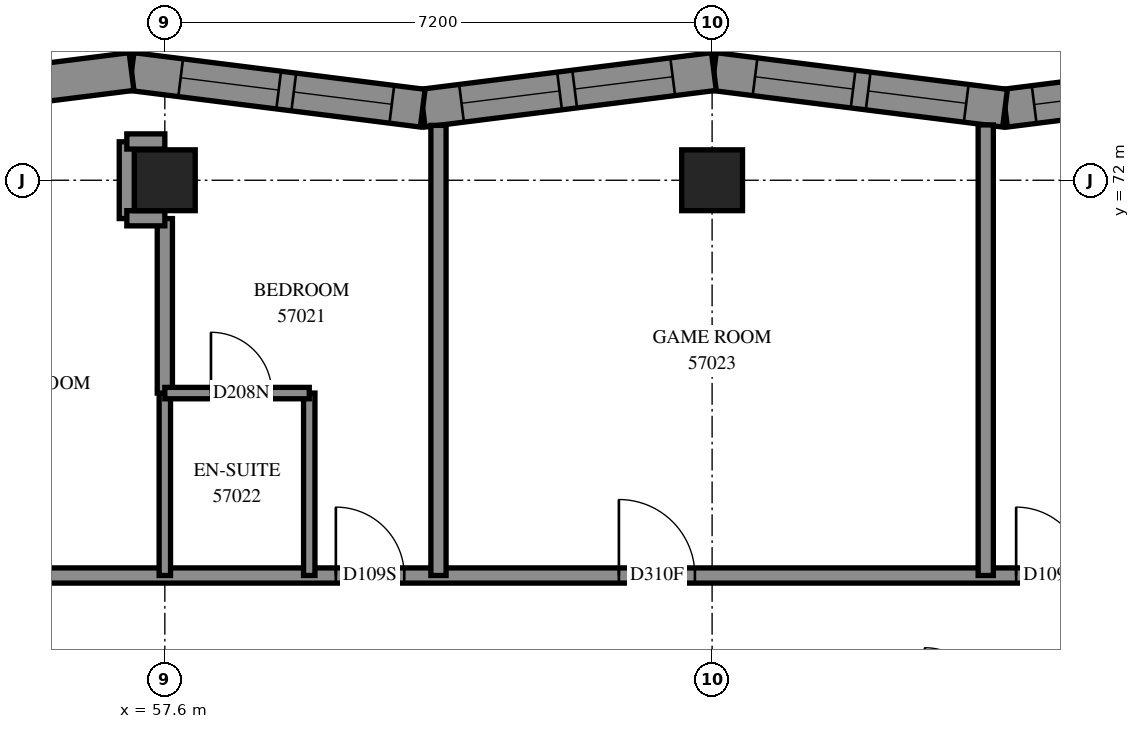
"""IFC4 building model, lengths in metres.
Left out: names, types, materials, properties, quantities, classifications, styles, units other than length and angle.
Written with IfcOpenShell. Run it as: python <this file> out.ifc"""

import sys

from ifc_helpers import new_model, si_unit, direction, frame, frame_2d, origin, origin_2d, place, context, subcontext, project, spatial, polyline, rectangle, outline, extrude, element, fill, save


model = new_model("IFC4")
c1 = context("Model", 3, precision=1e-05, world=origin(), true_north=direction((0.0, 1.0)))
c2 = subcontext(c1, "Body", "Model", "MODEL_VIEW")
j1 = project(units=[si_unit("LENGTHUNIT", "METRE"), si_unit("PLANEANGLEUNIT", "RADIAN")], contexts=[c1])
p1 = place(None, origin())
s1 = spatial("IfcSite", under=j1, at=p1, CompositionType="ELEMENT")
p2 = place(p1, origin())
s2 = spatial("IfcBuilding", under=s1, at=p2, CompositionType="ELEMENT")
p3 = place(p2, frame((0.0, 0.0, 210.0)))
s3 = spatial("IfcBuildingStorey", under=s2, at=p3, CompositionType="ELEMENT", Elevation=210.0)
for number, where, z_axis, x_axis in (
    (1, (57.6, 72.0, 0.0), (0.0, 0.0, 1.0), (1.0, 0.0, 0.0)),
    (2, (64.8, 72.0, 0.0), (0.0, 0.0, 1.0), (1.0, 0.0, 0.0)),
):
    element("IfcColumn", number, at=place(p3, frame(where, z_axis=z_axis, x_axis=x_axis)), inside=s3, PredefinedType="COLUMN", context=c2, shape_type="SweptSolid", body=[
        extrude(rectangle(XDim=0.8, YDim=0.8, at=origin_2d()), origin(), (0.0, 0.0, 1.0), 3.1),
    ])
p4 = place(p3, frame((72.484, 73.43, 0.0), z_axis=(0.0, 0.0, 1.0), x_axis=(-0.9921759282, -0.1248476171, 0.0)))
e3 = element("IfcWall", 3, at=p4, inside=s3, PredefinedType="SOLIDWALL", context=c2, shape_type="SweptSolid", body=[
    extrude(outline(polyline([(-0.032, -0.25), (3.829, -0.25), (3.892, 0.25), (0.032, 0.25), (-0.032, -0.25)])), origin(), (0.0, 0.0, 1.0), 3.1),
])
p5 = place(p4, frame((0.674, 0.0, 0.45)))
e4 = element("IfcOpeningElement", 4, at=p5, cuts=e3, PredefinedType="OPENING", context=c2, shape_type="SweptSolid", body=[
    extrude(rectangle(XDim=1.3, YDim=2.5, at=frame_2d((0.65, 1.25))), frame((0.0, 0.26, 0.0), z_axis=(0.0, -1.0, 0.0), x_axis=(1.0, 0.0, 0.0)), (0.0, 0.0, 1.0), 0.52),
])
p6 = place(p4, frame((2.174, 0.0, 0.45)))
e5 = element("IfcOpeningElement", 5, at=p6, cuts=e3, PredefinedType="OPENING", context=c2, shape_type="SweptSolid", body=[
    extrude(rectangle(XDim=1.3, YDim=2.5, at=frame_2d((0.65, 1.25))), frame((0.0, 0.26, 0.0), z_axis=(0.0, -1.0, 0.0), x_axis=(1.0, 0.0, 0.0)), (0.0, 0.0, 1.0), 0.52),
])
p7 = place(p3, frame((68.654, 72.948, 0.0), z_axis=(0.0, 0.0, 1.0), x_axis=(-0.9921759282, 0.1248476171, 0.0)))
e6 = element("IfcWall", 6, at=p7, inside=s3, PredefinedType="SOLIDWALL", context=c2, shape_type="SweptSolid", body=[
    extrude(outline(polyline([(0.032, -0.25), (3.892, -0.25), (3.829, 0.25), (-0.032, 0.25), (0.032, -0.25)])), origin(), (0.0, 0.0, 1.0), 3.1),
])
p8 = place(p7, frame((0.515, 0.0, 0.45)))
e7 = element("IfcOpeningElement", 7, at=p8, cuts=e6, PredefinedType="OPENING", context=c2, shape_type="SweptSolid", body=[
    extrude(rectangle(XDim=1.3, YDim=2.5, at=frame_2d((0.65, 1.25))), frame((0.0, 0.26, 0.0), z_axis=(0.0, -1.0, 0.0), x_axis=(1.0, 0.0, 0.0)), (0.0, 0.0, 1.0), 0.52),
])
p9 = place(p7, frame((2.015, 0.0, 0.45)))
e8 = element("IfcOpeningElement", 8, at=p9, cuts=e6, PredefinedType="OPENING", context=c2, shape_type="SweptSolid", body=[
    extrude(rectangle(XDim=1.3, YDim=2.5, at=frame_2d((0.65, 1.25))), frame((0.0, 0.26, 0.0), z_axis=(0.0, -1.0, 0.0), x_axis=(1.0, 0.0, 0.0)), (0.0, 0.0, 1.0), 0.52),
])
p10 = place(p3, frame((64.823, 73.43, 0.0), z_axis=(0.0, 0.0, 1.0), x_axis=(-0.9921759282, -0.1248476171, 0.0)))
e9 = element("IfcWall", 9, at=p10, inside=s3, PredefinedType="SOLIDWALL", context=c2, shape_type="SweptSolid", body=[
    extrude(outline(polyline([(-0.032, -0.25), (3.829, -0.25), (3.892, 0.25), (0.032, 0.25), (-0.032, -0.25)])), origin(), (0.0, 0.0, 1.0), 3.1),
])
p11 = place(p10, frame((0.546, 0.0, 0.45)))
e10 = element("IfcOpeningElement", 10, at=p11, cuts=e9, PredefinedType="OPENING", context=c2, shape_type="SweptSolid", body=[
    extrude(rectangle(XDim=1.3, YDim=2.5, at=frame_2d((0.65, 1.25))), frame((0.0, 0.26, 0.0), z_axis=(0.0, -1.0, 0.0), x_axis=(1.0, 0.0, 0.0)), (0.0, 0.0, 1.0), 0.52),
])
p12 = place(p10, frame((2.046, 0.0, 0.45)))
e11 = element("IfcOpeningElement", 11, at=p12, cuts=e9, PredefinedType="OPENING", context=c2, shape_type="SweptSolid", body=[
    extrude(rectangle(XDim=1.3, YDim=2.5, at=frame_2d((0.65, 1.25))), frame((0.0, 0.26, 0.0), z_axis=(0.0, -1.0, 0.0), x_axis=(1.0, 0.0, 0.0)), (0.0, 0.0, 1.0), 0.52),
])
p13 = place(p3, frame((60.993, 72.948, 0.0), z_axis=(0.0, 0.0, 1.0), x_axis=(-0.9921759282, 0.1248476171, 0.0)))
e12 = element("IfcWall", 12, at=p13, inside=s3, PredefinedType="SOLIDWALL", context=c2, shape_type="SweptSolid", body=[
    extrude(outline(polyline([(0.032, -0.25), (3.892, -0.25), (3.829, 0.25), (-0.032, 0.25), (0.032, -0.25)])), origin(), (0.0, 0.0, 1.0), 3.1),
])
p14 = place(p13, frame((0.41, 0.0, 0.45)))
e13 = element("IfcOpeningElement", 13, at=p14, cuts=e12, PredefinedType="OPENING", context=c2, shape_type="SweptSolid", body=[
    extrude(rectangle(XDim=1.3, YDim=2.5, at=frame_2d((0.65, 1.25))), frame((0.0, 0.26, 0.0), z_axis=(0.0, -1.0, 0.0), x_axis=(1.0, 0.0, 0.0)), (0.0, 0.0, 1.0), 0.52),
])
p15 = place(p13, frame((1.91, 0.0, 0.45)))
e14 = element("IfcOpeningElement", 14, at=p15, cuts=e12, PredefinedType="OPENING", context=c2, shape_type="SweptSolid", body=[
    extrude(rectangle(XDim=1.3, YDim=2.5, at=frame_2d((0.65, 1.25))), frame((0.0, 0.26, 0.0), z_axis=(0.0, -1.0, 0.0), x_axis=(1.0, 0.0, 0.0)), (0.0, 0.0, 1.0), 0.52),
])
p16 = place(p3, frame((57.162, 73.43, 0.0), z_axis=(0.0, 0.0, 1.0), x_axis=(-0.9921763319, -0.1248444087, 0.0)))
e15 = element("IfcWall", 15, at=p16, inside=s3, PredefinedType="SOLIDWALL", context=c2, shape_type="SweptSolid", body=[
    extrude(outline(polyline([(-0.032, -0.25), (3.829, -0.25), (3.892, 0.25), (0.032, 0.25), (-0.032, -0.25)])), origin(), (0.0, 0.0, 1.0), 3.1),
])
p17 = place(p16, frame((1.109, 0.0, 0.45)))
e16 = element("IfcOpeningElement", 16, at=p17, cuts=e15, PredefinedType="OPENING", context=c2, shape_type="SweptSolid", body=[
    extrude(rectangle(XDim=1.2, YDim=2.5, at=frame_2d((0.6, 1.25))), frame((0.0, 0.26, 0.0), z_axis=(0.0, -1.0, 0.0), x_axis=(1.0, 0.0, 0.0)), (0.0, 0.0, 1.0), 0.52),
])
p18 = place(p3, frame((55.6, 66.8, 0.0), z_axis=(0.0, 0.0, 1.0), x_axis=(1.0, 0.0, 0.0)))
e17 = element("IfcWall", 17, at=p18, inside=s3, PredefinedType="PARTITIONING", context=c2, shape_type="SweptSolid", body=[
    extrude(rectangle(XDim=18.4, YDim=0.2, at=frame_2d((9.2, 0.0))), origin(), (0.0, 0.0, 1.0), 3.1),
])
p19 = place(p18, frame((4.25, 0.0, 0.0)))
e18 = element("IfcOpeningElement", 18, at=p19, cuts=e17, PredefinedType="OPENING", context=c2, shape_type="SweptSolid", body=[
    extrude(rectangle(XDim=0.9, YDim=2.1, at=frame_2d((0.45, 1.05))), frame((0.0, 0.11, 0.0), z_axis=(0.0, -1.0, 0.0), x_axis=(1.0, 0.0, 0.0)), (0.0, 0.0, 1.0), 0.22),
])
p20 = place(p18, frame((7.974, 0.0, 0.0)))
e19 = element("IfcOpeningElement", 19, at=p20, cuts=e17, PredefinedType="OPENING", context=c2, shape_type="SweptSolid", body=[
    extrude(rectangle(XDim=1.0, YDim=2.1, at=frame_2d((0.5, 1.05))), frame((0.0, 0.11, 0.0), z_axis=(0.0, -1.0, 0.0), x_axis=(1.0, 0.0, 0.0)), (0.0, 0.0, 1.0), 0.22),
])
p21 = place(p18, frame((13.2, 0.0, 0.0)))
e20 = element("IfcOpeningElement", 20, at=p21, cuts=e17, PredefinedType="OPENING", context=c2, shape_type="SweptSolid", body=[
    extrude(rectangle(XDim=0.9, YDim=2.1, at=frame_2d((0.45, 1.05))), frame((0.0, 0.11, 0.0), z_axis=(0.0, -1.0, 0.0), x_axis=(1.0, 0.0, 0.0)), (0.0, 0.0, 1.0), 0.22),
])
p22 = place(p3, frame((68.4, 66.8, 0.0), z_axis=(0.0, 0.0, 1.0), x_axis=(0.0, 1.0, 0.0)))
e21 = element("IfcWall", 21, at=p22, inside=s3, PredefinedType="PARTITIONING", context=c2, shape_type="SweptSolid", body=[
    extrude(rectangle(XDim=5.928, YDim=0.2, at=frame_2d((2.964, 0.0))), origin(), (0.0, 0.0, 1.0), 3.1),
])
p23 = place(p3, frame((61.2, 66.8, 0.0), z_axis=(0.0, 0.0, 1.0), x_axis=(0.0, 1.0, 0.0)))
e22 = element("IfcWall", 22, at=p23, inside=s3, PredefinedType="PARTITIONING", context=c2, shape_type="SweptSolid", body=[
    extrude(rectangle(XDim=5.922, YDim=0.2, at=frame_2d((2.961, 0.0))), origin(), (0.0, 0.0, 1.0), 3.1),
])
for number, where, z_axis, x_axis in (
    (23, (57.6, 66.8, 0.0), (0.0, 0.0, 1.0), (0.0, 1.0, 0.0)),
    (24, (59.5, 66.8, 0.0), (0.0, 0.0, 1.0), (0.0, 1.0, 0.0)),
):
    element("IfcWall", number, at=place(p3, frame(where, z_axis=z_axis, x_axis=x_axis)), inside=s3, PredefinedType="PARTITIONING", context=c2, shape_type="SweptSolid", body=[
        extrude(rectangle(XDim=2.4, YDim=0.15, at=frame_2d((1.2, 0.0))), origin(), (0.0, 0.0, 1.0), 3.1),
    ])
p24 = place(p3, frame((57.6, 69.2, 0.0), z_axis=(0.0, 0.0, 1.0), x_axis=(0.0, 1.0, 0.0)))
e25 = element("IfcWall", 25, at=p24, inside=s3, PredefinedType="PARTITIONING", context=c2, shape_type="SweptSolid", body=[
    extrude(rectangle(XDim=2.296, YDim=0.2, at=frame_2d((1.148, 0.0))), origin(), (0.0, 0.0, 1.0), 3.1),
])
p25 = place(p3, frame((57.6, 69.2, 0.0), z_axis=(0.0, 0.0, 1.0), x_axis=(1.0, 0.0, 0.0)))
e26 = element("IfcWall", 26, at=p25, inside=s3, PredefinedType="PARTITIONING", context=c2, shape_type="SweptSolid", body=[
    extrude(rectangle(XDim=1.9, YDim=0.15, at=frame_2d((0.95, 0.0))), origin(), (0.0, 0.0, 1.0), 3.1),
])
p26 = place(p25, frame((0.607, 0.0, 0.0)))
e27 = element("IfcOpeningElement", 27, at=p26, cuts=e26, PredefinedType="OPENING", context=c2, shape_type="SweptSolid", body=[
    extrude(rectangle(XDim=0.8, YDim=2.1, at=frame_2d((0.4, 1.05))), frame((0.0, 0.085, 0.0), z_axis=(0.0, -1.0, 0.0), x_axis=(1.0, 0.0, 0.0)), (0.0, 0.0, 1.0), 0.17),
])
p27 = place(p3, frame((57.1, 71.496, 0.0), z_axis=(0.0, 0.0, 1.0), x_axis=(0.0, 1.0, 0.0)))
e28 = element("IfcWall", 28, at=p27, inside=s3, PredefinedType="PARTITIONING", context=c2, shape_type="SweptSolid", body=[
    extrude(rectangle(XDim=1.01, YDim=0.2, at=frame_2d((0.505, 0.0))), origin(), (0.0, 0.0, 1.0), 3.1),
])
for number, where, z_axis, x_axis in (
    (29, (57.1, 72.51, 0.0), (0.0, 0.0, 1.0), (1.0, 0.0, 0.0)),
    (30, (57.1, 71.5, 0.0), (0.0, 0.0, 1.0), (1.0, 0.0, 0.0)),
):
    element("IfcWall", number, at=place(p3, frame(where, z_axis=z_axis, x_axis=x_axis)), inside=s3, PredefinedType="PARTITIONING", context=c2, shape_type="SweptSolid", body=[
        extrude(rectangle(XDim=0.5, YDim=0.2, at=frame_2d((0.25, 0.0))), origin(), (0.0, 0.0, 1.0), 3.1),
    ])
p28 = place(p6, origin())
e31 = element("IfcWindow", 31, at=p28, inside=s3, PartitioningType="SINGLE_PANEL", PredefinedType="WINDOW", context=c2, shape_type="SweptSolid", body=[
    extrude(rectangle(XDim=1.3, YDim=2.5, at=frame_2d((0.65, 1.25))), frame((0.0, 0.18, 0.0), z_axis=(0.0, -1.0, 0.0), x_axis=(1.0, 0.0, 0.0)), (0.0, 0.0, 1.0), 0.06),
])
fill(e5, e31)
p29 = place(p8, origin())
e32 = element("IfcWindow", 32, at=p29, inside=s3, PartitioningType="SINGLE_PANEL", PredefinedType="WINDOW", context=c2, shape_type="SweptSolid", body=[
    extrude(rectangle(XDim=1.3, YDim=2.5, at=frame_2d((0.65, 1.25))), frame((0.0, 0.18, 0.0), z_axis=(0.0, -1.0, 0.0), x_axis=(1.0, 0.0, 0.0)), (0.0, 0.0, 1.0), 0.06),
])
fill(e7, e32)
p30 = place(p9, origin())
e33 = element("IfcWindow", 33, at=p30, inside=s3, PartitioningType="SINGLE_PANEL", PredefinedType="WINDOW", context=c2, shape_type="SweptSolid", body=[
    extrude(rectangle(XDim=1.3, YDim=2.5, at=frame_2d((0.65, 1.25))), frame((0.0, 0.18, 0.0), z_axis=(0.0, -1.0, 0.0), x_axis=(1.0, 0.0, 0.0)), (0.0, 0.0, 1.0), 0.06),
])
fill(e8, e33)
p31 = place(p11, origin())
e34 = element("IfcWindow", 34, at=p31, inside=s3, PartitioningType="SINGLE_PANEL", PredefinedType="WINDOW", context=c2, shape_type="SweptSolid", body=[
    extrude(rectangle(XDim=1.3, YDim=2.5, at=frame_2d((0.65, 1.25))), frame((0.0, 0.18, 0.0), z_axis=(0.0, -1.0, 0.0), x_axis=(1.0, 0.0, 0.0)), (0.0, 0.0, 1.0), 0.06),
])
fill(e10, e34)
p32 = place(p12, origin())
e35 = element("IfcWindow", 35, at=p32, inside=s3, PartitioningType="SINGLE_PANEL", PredefinedType="WINDOW", context=c2, shape_type="SweptSolid", body=[
    extrude(rectangle(XDim=1.3, YDim=2.5, at=frame_2d((0.65, 1.25))), frame((0.0, 0.18, 0.0), z_axis=(0.0, -1.0, 0.0), x_axis=(1.0, 0.0, 0.0)), (0.0, 0.0, 1.0), 0.06),
])
fill(e11, e35)
p33 = place(p14, origin())
e36 = element("IfcWindow", 36, at=p33, inside=s3, PartitioningType="SINGLE_PANEL", PredefinedType="WINDOW", context=c2, shape_type="SweptSolid", body=[
    extrude(rectangle(XDim=1.3, YDim=2.5, at=frame_2d((0.65, 1.25))), frame((0.0, 0.18, 0.0), z_axis=(0.0, -1.0, 0.0), x_axis=(1.0, 0.0, 0.0)), (0.0, 0.0, 1.0), 0.06),
])
fill(e13, e36)
p34 = place(p15, origin())
e37 = element("IfcWindow", 37, at=p34, inside=s3, PartitioningType="SINGLE_PANEL", PredefinedType="WINDOW", context=c2, shape_type="SweptSolid", body=[
    extrude(rectangle(XDim=1.3, YDim=2.5, at=frame_2d((0.65, 1.25))), frame((0.0, 0.18, 0.0), z_axis=(0.0, -1.0, 0.0), x_axis=(1.0, 0.0, 0.0)), (0.0, 0.0, 1.0), 0.06),
])
fill(e14, e37)
p35 = place(p19, origin())
e38 = element("IfcDoor", 38, at=p35, inside=s3, OperationType="SINGLE_SWING_RIGHT", PredefinedType="DOOR", context=c2, shape_type="SweptSolid", body=[
    extrude(rectangle(XDim=0.9, YDim=2.1, at=frame_2d((0.45, 1.05))), frame((0.0, 0.025, 0.0), z_axis=(0.0, -1.0, 0.0), x_axis=(1.0, 0.0, 0.0)), (0.0, 0.0, 1.0), 0.05),
])
fill(e18, e38)
p36 = place(p26, origin())
e39 = element("IfcDoor", 39, at=p36, inside=s3, OperationType="SINGLE_SWING_RIGHT", PredefinedType="DOOR", context=c2, shape_type="SweptSolid", body=[
    extrude(rectangle(XDim=0.8, YDim=2.1, at=frame_2d((0.4, 1.05))), frame((0.0, 0.025, 0.0), z_axis=(0.0, -1.0, 0.0), x_axis=(1.0, 0.0, 0.0)), (0.0, 0.0, 1.0), 0.05),
])
fill(e27, e39)
p37 = place(p20, origin())
e40 = element("IfcDoor", 40, at=p37, inside=s3, OperationType="SINGLE_SWING_LEFT", PredefinedType="DOOR", context=c2, shape_type="SweptSolid", body=[
    extrude(rectangle(XDim=1.0, YDim=2.1, at=frame_2d((0.5, 1.05))), frame((0.0, 0.025, 0.0), z_axis=(0.0, -1.0, 0.0), x_axis=(1.0, 0.0, 0.0)), (0.0, 0.0, 1.0), 0.05),
])
fill(e19, e40)
p38 = place(p21, origin())
e41 = element("IfcDoor", 41, at=p38, inside=s3, OperationType="SINGLE_SWING_LEFT", PredefinedType="DOOR", context=c2, shape_type="SweptSolid", body=[
    extrude(rectangle(XDim=0.9, YDim=2.1, at=frame_2d((0.45, 1.05))), frame((0.0, 0.025, 0.0), z_axis=(0.0, -1.0, 0.0), x_axis=(1.0, 0.0, 0.0)), (0.0, 0.0, 1.0), 0.05),
])
fill(e20, e41)
save(model, sys.argv[1])
